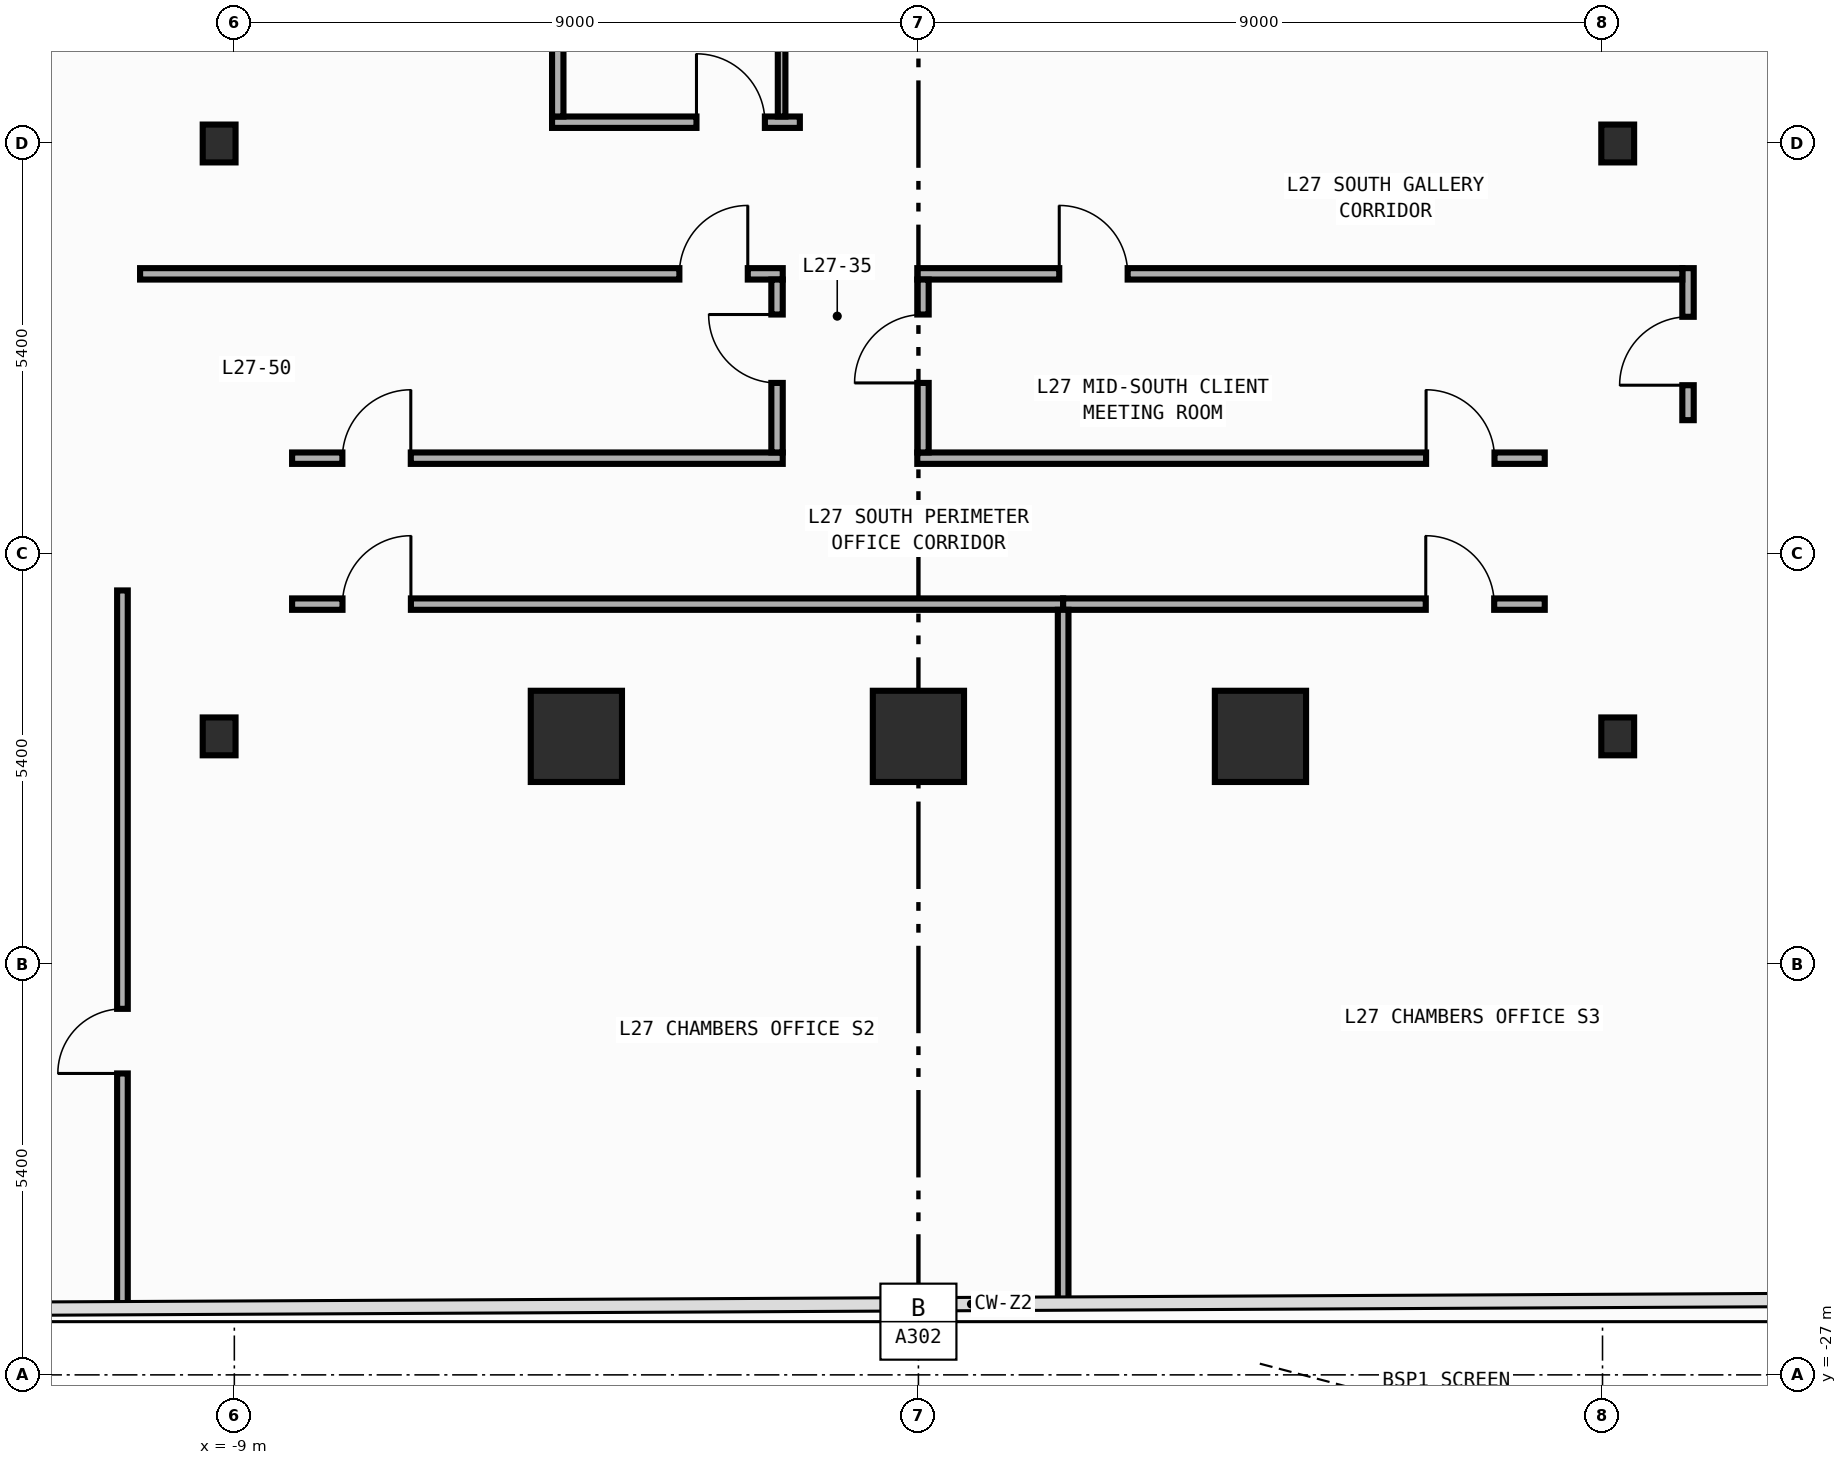
"""IFC4 building model, lengths in metres.
Left out: names, types, materials, properties, quantities, classifications, styles, units other than length and angle.
Written with IfcOpenShell. Run it as: python <this file> out.ifc"""

import sys

from ifc_helpers import new_model, si_unit, direction, frame, frame_2d, origin, origin_2d, place, context, subcontext, project, spatial, rectangle, i_section, extrude, element, fill, save


model = new_model("IFC4")
c1 = context("Model", 3, precision=1e-05, world=origin(), true_north=direction((0.0, 1.0)))
c2 = subcontext(c1, "Body", "Model", "MODEL_VIEW")
j1 = project(units=[si_unit("LENGTHUNIT", "METRE"), si_unit("PLANEANGLEUNIT", "RADIAN")], contexts=[c1])
p1 = place(None, origin())
s1 = spatial("IfcSite", under=j1, at=p1, CompositionType="ELEMENT")
p2 = place(p1, origin())
s2 = spatial("IfcBuilding", under=s1, at=p2, CompositionType="ELEMENT")
p3 = place(p2, frame((0.0, 0.0, 118.4)))
s3 = spatial("IfcBuildingStorey", under=s2, at=p3, CompositionType="ELEMENT", Elevation=118.4)
for number, where, z_axis, x_axis in (
    (1, (-9.2, -18.6, 0.0), (0.0, 0.0, 1.0), (1.0, 0.0, 0.0)),
    (2, (-9.2, -10.8, 0.0), (0.0, 0.0, 1.0), (1.0, 0.0, 0.0)),
    (3, (9.2, -18.6, 0.0), (0.0, 0.0, 1.0), (1.0, 0.0, 0.0)),
    (4, (9.2, -10.8, 0.0), (0.0, 0.0, 1.0), (1.0, 0.0, 0.0)),
):
    element("IfcColumn", number, at=place(p3, frame(where, z_axis=z_axis, x_axis=x_axis)), inside=s3, PredefinedType="COLUMN", context=c2, shape_type="SweptSolid", body=[
        extrude(i_section(OverallWidth=0.432, OverallDepth=0.498, WebThickness=0.045, FlangeThickness=0.07, FilletRadius=0.022, at=origin_2d()), origin(), (0.0, 0.0, 1.0), 4.2),
    ])
for number, where, z_axis, x_axis in (
    (5, (-4.5, -18.6, 0.0), (0.0, 0.0, 1.0), (1.0, 0.0, 0.0)),
    (6, (0.0, -18.6, 0.0), (0.0, 0.0, 1.0), (1.0, 0.0, 0.0)),
    (7, (4.5, -18.6, 0.0), (0.0, 0.0, 1.0), (1.0, 0.0, 0.0)),
):
    element("IfcColumn", number, at=place(p3, frame(where, z_axis=z_axis, x_axis=x_axis)), inside=s3, PredefinedType="COLUMN", context=c2, shape_type="SweptSolid", body=[
        extrude(rectangle(XDim=1.2, YDim=1.2, at=origin_2d()), origin(), (0.0, 0.0, 1.0), 4.2),
    ])
p4 = place(p3, frame((10.125, -14.44, 0.0), z_axis=(0.0, 0.0, 1.0), x_axis=(0.0, 1.0, 0.0)))
e8 = element("IfcWall", 8, at=p4, inside=s3, PredefinedType="PARTITIONING", context=c2, shape_type="SweptSolid", body=[
    extrude(rectangle(XDim=2.0, YDim=0.15, at=frame_2d((1.0, 0.0))), origin(), (0.0, 0.0, 1.0), 3.94),
])
p5 = place(p4, frame((0.46, 0.0, 0.0)))
e9 = element("IfcOpeningElement", 9, at=p5, cuts=e8, PredefinedType="OPENING", context=c2, shape_type="SweptSolid", body=[
    extrude(rectangle(XDim=0.9, YDim=2.15, at=frame_2d((0.45, 1.075))), frame((0.0, 0.085, 0.0), z_axis=(0.0, -1.0, 0.0), x_axis=(1.0, 0.0, 0.0)), (0.0, 0.0, 1.0), 0.17),
])
p6 = place(p3, frame((-4.82, -10.52, 0.0), z_axis=(0.0, 0.0, 1.0), x_axis=(1.0, 0.0, 0.0)))
e10 = element("IfcWall", 10, at=p6, inside=s3, PredefinedType="PARTITIONING", context=c2, shape_type="SweptSolid", body=[
    extrude(rectangle(XDim=3.26, YDim=0.15, at=frame_2d((1.63, 0.0))), origin(), (0.0, 0.0, 1.0), 3.24),
])
p7 = place(p6, frame((1.9, 0.0, 0.0)))
e11 = element("IfcOpeningElement", 11, at=p7, cuts=e10, PredefinedType="OPENING", context=c2, shape_type="SweptSolid", body=[
    extrude(rectangle(XDim=0.9, YDim=2.15, at=frame_2d((0.45, 1.075))), frame((0.0, 0.085, 0.0), z_axis=(0.0, -1.0, 0.0), x_axis=(1.0, 0.0, 0.0)), (0.0, 0.0, 1.0), 0.17),
])
p8 = place(p3, frame((-10.24, -12.515, 0.0), z_axis=(0.0, 0.0, 1.0), x_axis=(1.0, 0.0, 0.0)))
e12 = element("IfcWall", 12, at=p8, inside=s3, PredefinedType="PARTITIONING", context=c2, shape_type="SweptSolid", body=[
    extrude(rectangle(XDim=8.455, YDim=0.15, at=frame_2d((4.228, 0.0))), origin(), (0.0, 0.0, 1.0), 3.94),
])
p9 = place(p8, frame((7.095, 0.0, 0.0)))
e13 = element("IfcOpeningElement", 13, at=p9, cuts=e12, PredefinedType="OPENING", context=c2, shape_type="SweptSolid", body=[
    extrude(rectangle(XDim=0.9, YDim=2.15, at=frame_2d((0.45, 1.075))), frame((0.0, 0.085, 0.0), z_axis=(0.0, -1.0, 0.0), x_axis=(1.0, 0.0, 0.0)), (0.0, 0.0, 1.0), 0.17),
])
p10 = place(p3, frame((-0.015, -12.515, 0.0), z_axis=(0.0, 0.0, 1.0), x_axis=(1.0, 0.0, 0.0)))
e14 = element("IfcWall", 14, at=p10, inside=s3, PredefinedType="PARTITIONING", context=c2, shape_type="SweptSolid", body=[
    extrude(rectangle(XDim=10.065, YDim=0.15, at=frame_2d((5.032, 0.0))), origin(), (0.0, 0.0, 1.0), 3.94),
])
p11 = place(p10, frame((1.868, 0.0, 0.0)))
e15 = element("IfcOpeningElement", 15, at=p11, cuts=e14, PredefinedType="OPENING", context=c2, shape_type="SweptSolid", body=[
    extrude(rectangle(XDim=0.9, YDim=2.15, at=frame_2d((0.45, 1.075))), frame((0.0, 0.085, 0.0), z_axis=(0.0, -1.0, 0.0), x_axis=(1.0, 0.0, 0.0)), (0.0, 0.0, 1.0), 0.17),
])
p12 = place(p3, frame((-4.745, -10.445, 0.0), z_axis=(0.0, 0.0, 1.0), x_axis=(0.0, 1.0, 0.0)))
e16 = element("IfcWall", 16, at=p12, inside=s3, PredefinedType="PARTITIONING", context=c2, shape_type="SweptSolid", body=[
    extrude(rectangle(XDim=2.825, YDim=0.15, at=frame_2d((1.413, 0.0))), origin(), (0.0, 0.0, 1.0), 3.49),
])
p13 = place(p12, frame((1.465, 0.0, 0.0)))
e17 = element("IfcOpeningElement", 17, at=p13, cuts=e16, PredefinedType="OPENING", context=c2, shape_type="SweptSolid", body=[
    extrude(rectangle(XDim=0.9, YDim=2.15, at=frame_2d((0.45, 1.075))), frame((0.0, 0.085, 0.0), z_axis=(0.0, -1.0, 0.0), x_axis=(1.0, 0.0, 0.0)), (0.0, 0.0, 1.0), 0.17),
])
p14 = place(p3, frame((-8.24, -16.86, 0.0), z_axis=(0.0, 0.0, 1.0), x_axis=(1.0, 0.0, 0.0)))
e18 = element("IfcWall", 18, at=p14, inside=s3, PredefinedType="PARTITIONING", context=c2, shape_type="SweptSolid", body=[
    extrude(rectangle(XDim=10.144, YDim=0.15, at=frame_2d((5.072, 0.0))), origin(), (0.0, 0.0, 1.0), 3.94),
])
p15 = place(p14, frame((0.663, 0.0, 0.0)))
e19 = element("IfcOpeningElement", 19, at=p15, cuts=e18, PredefinedType="OPENING", context=c2, shape_type="SweptSolid", body=[
    extrude(rectangle(XDim=0.9, YDim=2.15, at=frame_2d((0.45, 1.075))), frame((0.0, 0.085, 0.0), z_axis=(0.0, -1.0, 0.0), x_axis=(1.0, 0.0, 0.0)), (0.0, 0.0, 1.0), 0.17),
])
p16 = place(p3, frame((1.904, -16.86, 0.0), z_axis=(0.0, 0.0, 1.0), x_axis=(1.0, 0.0, 0.0)))
e20 = element("IfcWall", 20, at=p16, inside=s3, PredefinedType="PARTITIONING", context=c2, shape_type="SweptSolid", body=[
    extrude(rectangle(XDim=6.336, YDim=0.15, at=frame_2d((3.168, 0.0))), origin(), (0.0, 0.0, 1.0), 3.94),
])
p17 = place(p16, frame((4.771, 0.0, 0.0)))
e21 = element("IfcOpeningElement", 21, at=p17, cuts=e20, PredefinedType="OPENING", context=c2, shape_type="SweptSolid", body=[
    extrude(rectangle(XDim=0.9, YDim=2.15, at=frame_2d((0.45, 1.075))), frame((0.0, 0.085, 0.0), z_axis=(0.0, -1.0, 0.0), x_axis=(1.0, 0.0, 0.0)), (0.0, 0.0, 1.0), 0.17),
])
p18 = place(p3, frame((-8.24, -14.94, 0.0), z_axis=(0.0, 0.0, 1.0), x_axis=(1.0, 0.0, 0.0)))
e22 = element("IfcWall", 22, at=p18, inside=s3, PredefinedType="PARTITIONING", context=c2, shape_type="SweptSolid", body=[
    extrude(rectangle(XDim=6.455, YDim=0.15, at=frame_2d((3.228, 0.0))), origin(), (0.0, 0.0, 1.0), 3.94),
])
p19 = place(p18, frame((0.662, 0.0, 0.0)))
e23 = element("IfcOpeningElement", 23, at=p19, cuts=e22, PredefinedType="OPENING", context=c2, shape_type="SweptSolid", body=[
    extrude(rectangle(XDim=0.9, YDim=2.15, at=frame_2d((0.45, 1.075))), frame((0.0, 0.085, 0.0), z_axis=(0.0, -1.0, 0.0), x_axis=(1.0, 0.0, 0.0)), (0.0, 0.0, 1.0), 0.17),
])
p20 = place(p3, frame((-0.015, -14.94, 0.0), z_axis=(0.0, 0.0, 1.0), x_axis=(1.0, 0.0, 0.0)))
e24 = element("IfcWall", 24, at=p20, inside=s3, PredefinedType="PARTITIONING", context=c2, shape_type="SweptSolid", body=[
    extrude(rectangle(XDim=8.255, YDim=0.15, at=frame_2d((4.127, 0.0))), origin(), (0.0, 0.0, 1.0), 3.94),
])
p21 = place(p20, frame((6.694, 0.0, 0.0)))
e25 = element("IfcOpeningElement", 25, at=p21, cuts=e24, PredefinedType="OPENING", context=c2, shape_type="SweptSolid", body=[
    extrude(rectangle(XDim=0.9, YDim=2.15, at=frame_2d((0.45, 1.075))), frame((0.0, 0.085, 0.0), z_axis=(0.0, -1.0, 0.0), x_axis=(1.0, 0.0, 0.0)), (0.0, 0.0, 1.0), 0.17),
])
p22 = place(p3, frame((-1.86, -14.865, 0.0), z_axis=(0.0, 0.0, 1.0), x_axis=(0.0, 1.0, 0.0)))
e26 = element("IfcWall", 26, at=p22, inside=s3, PredefinedType="PARTITIONING", context=c2, shape_type="SweptSolid", body=[
    extrude(rectangle(XDim=2.275, YDim=0.15, at=frame_2d((1.137, 0.0))), origin(), (0.0, 0.0, 1.0), 3.94),
])
p23 = place(p22, frame((0.915, 0.0, 0.0)))
e27 = element("IfcOpeningElement", 27, at=p23, cuts=e26, PredefinedType="OPENING", context=c2, shape_type="SweptSolid", body=[
    extrude(rectangle(XDim=0.9, YDim=2.15, at=frame_2d((0.45, 1.075))), frame((0.0, 0.085, 0.0), z_axis=(0.0, -1.0, 0.0), x_axis=(1.0, 0.0, 0.0)), (0.0, 0.0, 1.0), 0.17),
])
p24 = place(p3, frame((0.06, -14.865, 0.0), z_axis=(0.0, 0.0, 1.0), x_axis=(0.0, 1.0, 0.0)))
e28 = element("IfcWall", 28, at=p24, inside=s3, PredefinedType="PARTITIONING", context=c2, shape_type="SweptSolid", body=[
    extrude(rectangle(XDim=2.275, YDim=0.15, at=frame_2d((1.137, 0.0))), origin(), (0.0, 0.0, 1.0), 3.94),
])
p25 = place(p24, frame((0.915, 0.0, 0.0)))
e29 = element("IfcOpeningElement", 29, at=p25, cuts=e28, PredefinedType="OPENING", context=c2, shape_type="SweptSolid", body=[
    extrude(rectangle(XDim=0.9, YDim=2.15, at=frame_2d((0.45, 1.075))), frame((0.0, 0.085, 0.0), z_axis=(0.0, -1.0, 0.0), x_axis=(1.0, 0.0, 0.0)), (0.0, 0.0, 1.0), 0.17),
])
p26 = place(p3, frame((-10.472, -26.118, 0.0), z_axis=(0.0, 0.0, 1.0), x_axis=(0.0, 1.0, 0.0)))
e30 = element("IfcWall", 30, at=p26, inside=s3, PredefinedType="PARTITIONING", context=c2, shape_type="SweptSolid", body=[
    extrude(rectangle(XDim=9.438, YDim=0.14, at=frame_2d((4.719, 0.0))), origin(), (0.0, 0.0, 1.0), 3.94),
])
p27 = place(p26, frame((3.083, 0.0, 0.0)))
e31 = element("IfcOpeningElement", 31, at=p27, cuts=e30, PredefinedType="OPENING", context=c2, shape_type="SweptSolid", body=[
    extrude(rectangle(XDim=0.85, YDim=2.1, at=frame_2d((0.425, 1.05))), frame((0.0, 0.08, 0.0), z_axis=(0.0, -1.0, 0.0), x_axis=(1.0, 0.0, 0.0)), (0.0, 0.0, 1.0), 0.16),
])
p28 = place(p3, frame((1.904, -26.057, 0.0), z_axis=(0.0, 0.0, 1.0), x_axis=(0.0, 1.0, 0.0)))
e32 = element("IfcWall", 32, at=p28, inside=s3, PredefinedType="PARTITIONING", context=c2, shape_type="SweptSolid", body=[
    extrude(rectangle(XDim=9.122, YDim=0.14, at=frame_2d((4.561, 0.0))), origin(), (0.0, 0.0, 1.0), 3.94),
])
p29 = place(p3, frame((-1.8, -7.69, 0.0), z_axis=(0.0, 0.0, 1.0), x_axis=(0.0, -1.0, 0.0)))
e33 = element("IfcWall", 33, at=p29, inside=s3, PredefinedType="PARTITIONING", context=c2, shape_type="SweptSolid", body=[
    extrude(rectangle(XDim=2.755, YDim=0.1, at=frame_2d((1.377, 0.0))), origin(), (0.0, 0.0, 1.0), 3.94),
])
p30 = place(p5, origin())
e34 = element("IfcDoor", 34, at=p30, inside=s3, OperationType="SINGLE_SWING_LEFT", PredefinedType="DOOR", context=c2, shape_type="SweptSolid", body=[
    extrude(rectangle(XDim=0.9, YDim=2.15, at=frame_2d((0.45, 1.075))), frame((0.0, 0.025, 0.0), z_axis=(0.0, -1.0, 0.0), x_axis=(1.0, 0.0, 0.0)), (0.0, 0.0, 1.0), 0.05),
])
fill(e9, e34)
p31 = place(p7, origin())
e35 = element("IfcDoor", 35, at=p31, inside=s3, OperationType="SINGLE_SWING_LEFT", PredefinedType="DOOR", context=c2, shape_type="SweptSolid", body=[
    extrude(rectangle(XDim=0.9, YDim=2.15, at=frame_2d((0.45, 1.075))), frame((0.0, 0.025, 0.0), z_axis=(0.0, -1.0, 0.0), x_axis=(1.0, 0.0, 0.0)), (0.0, 0.0, 1.0), 0.05),
])
fill(e11, e35)
p32 = place(p9, origin())
e36 = element("IfcDoor", 36, at=p32, inside=s3, OperationType="SINGLE_SWING_RIGHT", PredefinedType="DOOR", context=c2, shape_type="SweptSolid", body=[
    extrude(rectangle(XDim=0.9, YDim=2.15, at=frame_2d((0.45, 1.075))), frame((0.0, 0.025, 0.0), z_axis=(0.0, -1.0, 0.0), x_axis=(1.0, 0.0, 0.0)), (0.0, 0.0, 1.0), 0.05),
])
fill(e13, e36)
p33 = place(p11, origin())
e37 = element("IfcDoor", 37, at=p33, inside=s3, OperationType="SINGLE_SWING_LEFT", PredefinedType="DOOR", context=c2, shape_type="SweptSolid", body=[
    extrude(rectangle(XDim=0.9, YDim=2.15, at=frame_2d((0.45, 1.075))), frame((0.0, 0.025, 0.0), z_axis=(0.0, -1.0, 0.0), x_axis=(1.0, 0.0, 0.0)), (0.0, 0.0, 1.0), 0.05),
])
fill(e15, e37)
p34 = place(p15, origin())
e38 = element("IfcDoor", 38, at=p34, inside=s3, OperationType="SINGLE_SWING_RIGHT", PredefinedType="DOOR", context=c2, shape_type="SweptSolid", body=[
    extrude(rectangle(XDim=0.9, YDim=2.15, at=frame_2d((0.45, 1.075))), frame((0.0, 0.025, 0.0), z_axis=(0.0, -1.0, 0.0), x_axis=(1.0, 0.0, 0.0)), (0.0, 0.0, 1.0), 0.05),
])
fill(e19, e38)
p35 = place(p17, origin())
e39 = element("IfcDoor", 39, at=p35, inside=s3, OperationType="SINGLE_SWING_LEFT", PredefinedType="DOOR", context=c2, shape_type="SweptSolid", body=[
    extrude(rectangle(XDim=0.9, YDim=2.15, at=frame_2d((0.45, 1.075))), frame((0.0, 0.025, 0.0), z_axis=(0.0, -1.0, 0.0), x_axis=(1.0, 0.0, 0.0)), (0.0, 0.0, 1.0), 0.05),
])
fill(e21, e39)
p36 = place(p19, origin())
e40 = element("IfcDoor", 40, at=p36, inside=s3, OperationType="SINGLE_SWING_RIGHT", PredefinedType="DOOR", context=c2, shape_type="SweptSolid", body=[
    extrude(rectangle(XDim=0.9, YDim=2.15, at=frame_2d((0.45, 1.075))), frame((0.0, 0.025, 0.0), z_axis=(0.0, -1.0, 0.0), x_axis=(1.0, 0.0, 0.0)), (0.0, 0.0, 1.0), 0.05),
])
fill(e23, e40)
p37 = place(p21, origin())
e41 = element("IfcDoor", 41, at=p37, inside=s3, OperationType="SINGLE_SWING_LEFT", PredefinedType="DOOR", context=c2, shape_type="SweptSolid", body=[
    extrude(rectangle(XDim=0.9, YDim=2.15, at=frame_2d((0.45, 1.075))), frame((0.0, 0.025, 0.0), z_axis=(0.0, -1.0, 0.0), x_axis=(1.0, 0.0, 0.0)), (0.0, 0.0, 1.0), 0.05),
])
fill(e25, e41)
p38 = place(p23, origin())
e42 = element("IfcDoor", 42, at=p38, inside=s3, OperationType="SINGLE_SWING_RIGHT", PredefinedType="DOOR", context=c2, shape_type="SweptSolid", body=[
    extrude(rectangle(XDim=0.9, YDim=2.15, at=frame_2d((0.45, 1.075))), frame((0.0, 0.025, 0.0), z_axis=(0.0, -1.0, 0.0), x_axis=(1.0, 0.0, 0.0)), (0.0, 0.0, 1.0), 0.05),
])
fill(e27, e42)
p39 = place(p25, origin())
e43 = element("IfcDoor", 43, at=p39, inside=s3, OperationType="SINGLE_SWING_LEFT", PredefinedType="DOOR", context=c2, shape_type="SweptSolid", body=[
    extrude(rectangle(XDim=0.9, YDim=2.15, at=frame_2d((0.45, 1.075))), frame((0.0, 0.025, 0.0), z_axis=(0.0, -1.0, 0.0), x_axis=(1.0, 0.0, 0.0)), (0.0, 0.0, 1.0), 0.05),
])
fill(e29, e43)
p40 = place(p27, origin())
e44 = element("IfcDoor", 44, at=p40, inside=s3, OperationType="SINGLE_SWING_LEFT", PredefinedType="DOOR", context=c2, shape_type="SweptSolid", body=[
    extrude(rectangle(XDim=0.85, YDim=2.1, at=frame_2d((0.425, 1.05))), frame((0.0, 0.025, 0.0), z_axis=(0.0, -1.0, 0.0), x_axis=(1.0, 0.0, 0.0)), (0.0, 0.0, 1.0), 0.05),
])
fill(e31, e44)
save(model, sys.argv[1])
